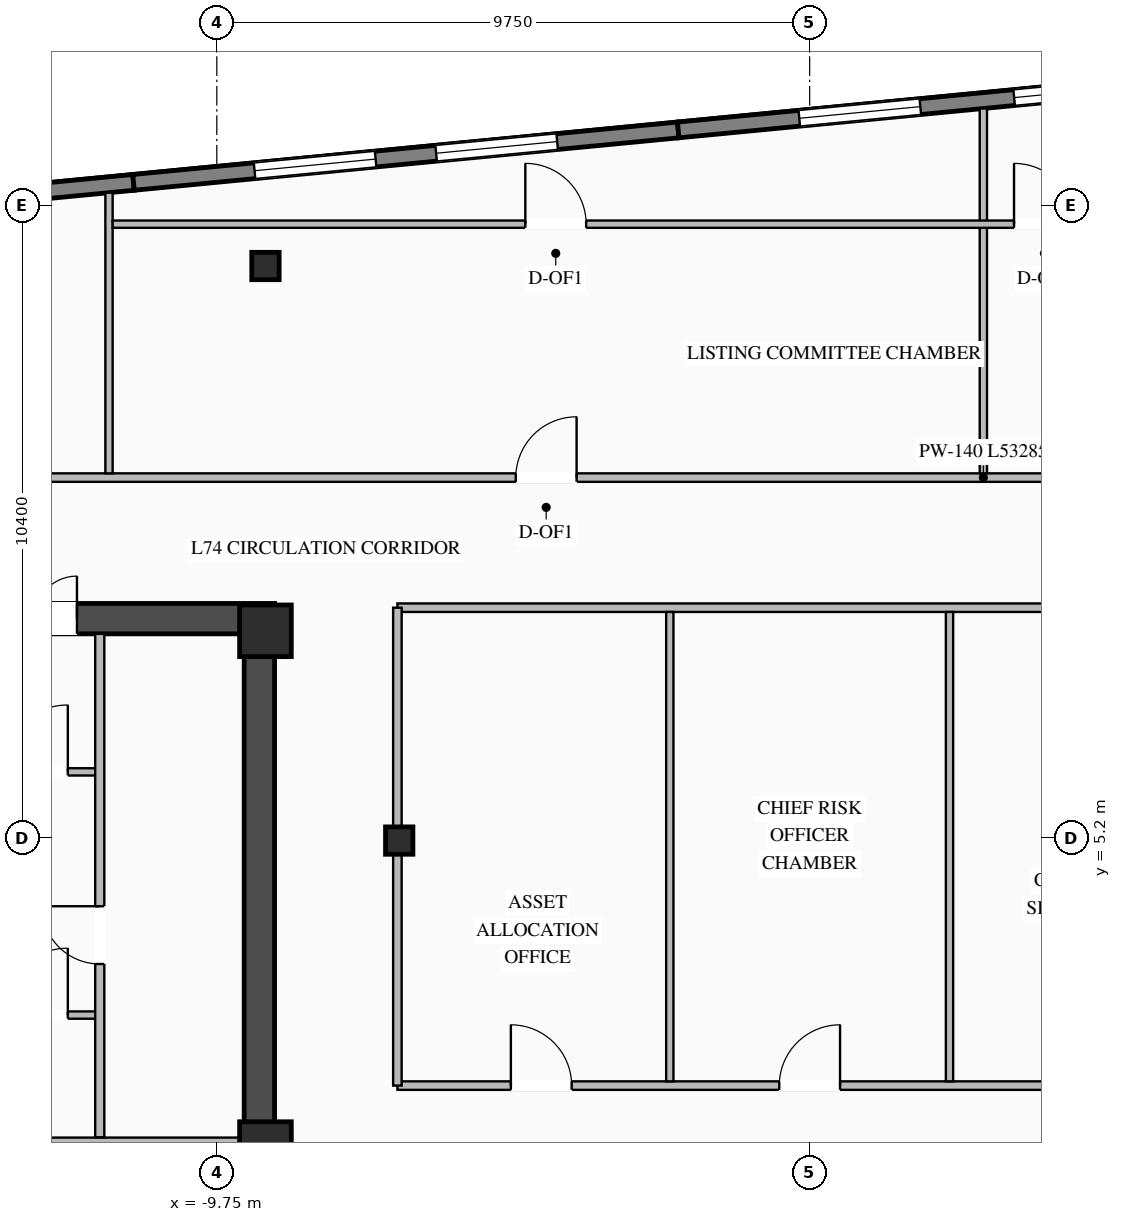
"""IFC4 building model, lengths in metres.
Left out: names, types, materials, properties, quantities, classifications, styles, units other than length and angle.
Written with IfcOpenShell. Run it as: python <this file> out.ifc"""

import sys

from ifc_helpers import new_model, si_unit, direction, frame, frame_2d, origin, origin_2d, place, context, subcontext, project, spatial, rectangle, i_section, extrude, element, fill, save


model = new_model("IFC4")
c1 = context("Model", 3, precision=1e-05, world=origin(), true_north=direction((0.0, 1.0)))
c2 = subcontext(c1, "Body", "Model", "MODEL_VIEW")
j1 = project(units=[si_unit("LENGTHUNIT", "METRE"), si_unit("PLANEANGLEUNIT", "RADIAN")], contexts=[c1])
p1 = place(None, origin())
s1 = spatial("IfcSite", under=j1, at=p1, CompositionType="ELEMENT")
p2 = place(p1, origin())
s2 = spatial("IfcBuilding", under=s1, at=p2, CompositionType="ELEMENT")
p3 = place(p2, frame((0.0, 0.0, 272.4)))
s3 = spatial("IfcBuildingStorey", under=s2, at=p3, CompositionType="ELEMENT", Elevation=272.4)
p4 = place(p3, frame((-19.05, 8.8, 0.0), z_axis=(0.0, 0.0, 1.0), x_axis=(1.0, 0.0, 0.0)))
e1 = element("IfcWall", 1, at=p4, inside=s3, PredefinedType="SHEAR", context=c2, shape_type="SweptSolid", body=[
    extrude(rectangle(XDim=10.25, YDim=0.5, at=frame_2d((5.125, 0.0))), origin(), (0.0, 0.0, 1.0), 3.27),
])
p5 = place(p4, frame((5.6, 0.0, 0.0)))
e2 = element("IfcOpeningElement", 2, at=p5, cuts=e1, PredefinedType="OPENING", context=c2, shape_type="SweptSolid", body=[
    extrude(rectangle(XDim=1.4, YDim=2.05, at=frame_2d((0.7, 1.025))), frame((0.0, 0.26, 0.0), z_axis=(0.0, -1.0, 0.0), x_axis=(1.0, 0.0, 0.0)), (0.0, 0.0, 1.0), 0.52),
])
p6 = place(p3, frame((-9.05, -8.55, 0.0), z_axis=(0.0, 0.0, 1.0), x_axis=(0.0, 1.0, 0.0)))
e3 = element("IfcWall", 3, at=p6, inside=s3, PredefinedType="SHEAR", context=c2, shape_type="SweptSolid", body=[
    extrude(rectangle(XDim=17.1, YDim=0.5, at=frame_2d((8.55, 0.0))), origin(), (0.0, 0.0, 1.0), 3.27),
])
p7 = place(p6, frame((5.3, 0.0, 0.0)))
e4 = element("IfcOpeningElement", 4, at=p7, cuts=e3, PredefinedType="OPENING", context=c2, shape_type="SweptSolid", body=[
    extrude(rectangle(XDim=1.1, YDim=2.08, at=frame_2d((0.55, 1.04))), frame((0.0, 0.26, 0.0), z_axis=(0.0, -1.0, 0.0), x_axis=(1.0, 0.0, 0.0)), (0.0, 0.0, 1.0), 0.52),
])
for number, where, z_axis, x_axis in (
    (5, (-8.95, 0.1, 0.0), (0.0, 0.0, 1.0), (1.0, 0.0, 0.0)),
    (6, (-8.95, 8.6, 0.0), (0.0, 0.0, 1.0), (1.0, 0.0, 0.0)),
):
    element("IfcColumn", number, at=place(p3, frame(where, z_axis=z_axis, x_axis=x_axis)), inside=s3, PredefinedType="COLUMN", context=c2, shape_type="SweptSolid", body=[
        extrude(rectangle(XDim=0.85, YDim=0.85, at=origin_2d()), origin(), (0.0, 0.0, 1.0), 3.45),
    ])
for number, where, z_axis, x_axis in (
    (7, (-6.75, 5.15, 0.0), (0.0, 0.0, 1.0), (1.0, 0.0, 0.0)),
    (8, (-8.95, 14.6, 0.0), (0.0, 0.0, 1.0), (1.0, 0.0, 0.0)),
):
    element("IfcColumn", number, at=place(p3, frame(where, z_axis=z_axis, x_axis=x_axis)), inside=s3, PredefinedType="COLUMN", context=c2, shape_type="SweptSolid", body=[
        extrude(i_section(OverallWidth=0.45, OverallDepth=0.45, WebThickness=0.022, FlangeThickness=0.032, at=origin_2d()), origin(), (0.0, 0.0, 1.0), 3.45),
    ])
p8 = place(p3, frame((-21.821, 14.945, 0.0), z_axis=(0.0, 0.0, 1.0), x_axis=(0.995394787719, 0.095860401528, 0.0)))
e9 = element("IfcWall", 9, at=p8, inside=s3, PredefinedType="STANDARD", context=c2, shape_type="SweptSolid", body=[
    extrude(rectangle(XDim=10.75, YDim=0.26, at=frame_2d((5.375, 0.0))), origin(), (0.0, 0.0, 1.0), 3.25),
])
p9 = place(p8, frame((2.583, 0.0, 0.76)))
e10 = element("IfcOpeningElement", 10, at=p9, cuts=e9, PredefinedType="OPENING", context=c2, shape_type="SweptSolid", body=[
    extrude(rectangle(XDim=2.0, YDim=2.05, at=frame_2d((1.0, 1.025))), frame((0.0, 0.14, 0.0), z_axis=(0.0, -1.0, 0.0), x_axis=(1.0, 0.0, 0.0)), (0.0, 0.0, 1.0), 0.28),
])
p10 = place(p8, frame((6.167, 0.0, 0.76)))
e11 = element("IfcOpeningElement", 11, at=p10, cuts=e9, PredefinedType="OPENING", context=c2, shape_type="SweptSolid", body=[
    extrude(rectangle(XDim=2.0, YDim=2.05, at=frame_2d((1.0, 1.025))), frame((0.0, 0.14, 0.0), z_axis=(0.0, -1.0, 0.0), x_axis=(1.0, 0.0, 0.0)), (0.0, 0.0, 1.0), 0.28),
])
p11 = place(p3, frame((-11.12, 15.975, 0.0), z_axis=(0.0, 0.0, 1.0), x_axis=(0.995396794462, 0.09583956164, 0.0)))
e12 = element("IfcWall", 12, at=p11, inside=s3, PredefinedType="STANDARD", context=c2, shape_type="SweptSolid", body=[
    extrude(rectangle(XDim=9.0, YDim=0.26, at=frame_2d((4.5, 0.0))), origin(), (0.0, 0.0, 1.0), 3.25),
])
p12 = place(p11, frame((2.0, 0.0, 0.76)))
e13 = element("IfcOpeningElement", 13, at=p12, cuts=e12, PredefinedType="OPENING", context=c2, shape_type="SweptSolid", body=[
    extrude(rectangle(XDim=2.0, YDim=2.05, at=frame_2d((1.0, 1.025))), frame((0.0, 0.14, 0.0), z_axis=(0.0, -1.0, 0.0), x_axis=(1.0, 0.0, 0.0)), (0.0, 0.0, 1.0), 0.28),
])
p13 = place(p11, frame((5.0, 0.0, 0.76)))
e14 = element("IfcOpeningElement", 14, at=p13, cuts=e12, PredefinedType="OPENING", context=c2, shape_type="SweptSolid", body=[
    extrude(rectangle(XDim=2.0, YDim=2.05, at=frame_2d((1.0, 1.025))), frame((0.0, 0.14, 0.0), z_axis=(0.0, -1.0, 0.0), x_axis=(1.0, 0.0, 0.0)), (0.0, 0.0, 1.0), 0.28),
])
p14 = place(p3, frame((-2.161, 16.838, 0.0), z_axis=(0.0, 0.0, 1.0), x_axis=(0.995396794462, 0.09583956164, 0.0)))
e15 = element("IfcWall", 15, at=p14, inside=s3, PredefinedType="STANDARD", context=c2, shape_type="SweptSolid", body=[
    extrude(rectangle(XDim=9.0, YDim=0.26, at=frame_2d((4.5, 0.0))), origin(), (0.0, 0.0, 1.0), 3.25),
])
p15 = place(p14, frame((2.0, 0.0, 0.76)))
e16 = element("IfcOpeningElement", 16, at=p15, cuts=e15, PredefinedType="OPENING", context=c2, shape_type="SweptSolid", body=[
    extrude(rectangle(XDim=2.0, YDim=2.05, at=frame_2d((1.0, 1.025))), frame((0.0, 0.14, 0.0), z_axis=(0.0, -1.0, 0.0), x_axis=(1.0, 0.0, 0.0)), (0.0, 0.0, 1.0), 0.28),
])
p16 = place(p14, frame((5.55, 0.0, 0.76)))
e17 = element("IfcOpeningElement", 17, at=p16, cuts=e15, PredefinedType="OPENING", context=c2, shape_type="SweptSolid", body=[
    extrude(rectangle(XDim=2.0, YDim=2.05, at=frame_2d((1.0, 1.025))), frame((0.0, 0.14, 0.0), z_axis=(0.0, -1.0, 0.0), x_axis=(1.0, 0.0, 0.0)), (0.0, 0.0, 1.0), 0.28),
])
p17 = place(p3, frame((-12.89, 0.19, 0.0), z_axis=(0.0, 0.0, 1.0), x_axis=(1.0, 0.0, 0.0)))
e18 = element("IfcWall", 18, at=p17, inside=s3, PredefinedType="STANDARD", context=c2, shape_type="SweptSolid", body=[
    extrude(rectangle(XDim=3.59, YDim=0.15, at=frame_2d((1.795, 0.0))), origin(), (0.0, 0.0, 1.0), 2.645),
])
p18 = place(p3, frame((-13.75, 2.28, 0.0), z_axis=(0.0, 0.0, 1.0), x_axis=(1.0, 0.0, 0.0)))
e19 = element("IfcWall", 19, at=p18, inside=s3, PredefinedType="STANDARD", context=c2, shape_type="SweptSolid", body=[
    extrude(rectangle(XDim=2.0, YDim=0.12, at=frame_2d((1.0, 0.0))), origin(), (0.0, 0.0, 1.0), 3.25),
])
p19 = place(p18, frame((0.45, 0.0, 0.0)))
e20 = element("IfcOpeningElement", 20, at=p19, cuts=e19, PredefinedType="OPENING", context=c2, shape_type="SweptSolid", body=[
    extrude(rectangle(XDim=1.1, YDim=2.1, at=frame_2d((0.55, 1.05))), frame((0.0, 0.07, 0.0), z_axis=(0.0, -1.0, 0.0), x_axis=(1.0, 0.0, 0.0)), (0.0, 0.0, 1.0), 0.14),
])
p20 = place(p3, frame((-13.75, 6.28, 0.0), z_axis=(0.0, 0.0, 1.0), x_axis=(1.0, 0.0, 0.0)))
e21 = element("IfcWall", 21, at=p20, inside=s3, PredefinedType="STANDARD", context=c2, shape_type="SweptSolid", body=[
    extrude(rectangle(XDim=2.0, YDim=0.12, at=frame_2d((1.0, 0.0))), origin(), (0.0, 0.0, 1.0), 3.25),
])
p21 = place(p20, frame((0.45, 0.0, 0.0)))
e22 = element("IfcOpeningElement", 22, at=p21, cuts=e21, PredefinedType="OPENING", context=c2, shape_type="SweptSolid", body=[
    extrude(rectangle(XDim=1.1, YDim=2.1, at=frame_2d((0.55, 1.05))), frame((0.0, 0.07, 0.0), z_axis=(0.0, -1.0, 0.0), x_axis=(1.0, 0.0, 0.0)), (0.0, 0.0, 1.0), 0.14),
])
p22 = place(p3, frame((-11.675, 0.27, 0.0), z_axis=(0.0, 0.0, 1.0), x_axis=(0.0, 1.0, 0.0)))
e23 = element("IfcWall", 23, at=p22, inside=s3, PredefinedType="STANDARD", context=c2, shape_type="SweptSolid", body=[
    extrude(rectangle(XDim=8.28, YDim=0.15, at=frame_2d((4.14, 0.0))), origin(), (0.0, 0.0, 1.0), 3.25),
])
p23 = place(p22, frame((2.85, 0.0, 0.0)))
e24 = element("IfcOpeningElement", 24, at=p23, cuts=e23, PredefinedType="OPENING", context=c2, shape_type="SweptSolid", body=[
    extrude(rectangle(XDim=0.95, YDim=2.05, at=frame_2d((0.475, 1.025))), frame((0.0, 0.085, 0.0), z_axis=(0.0, -1.0, 0.0), x_axis=(1.0, 0.0, 0.0)), (0.0, 0.0, 1.0), 0.17),
])
p24 = place(p3, frame((-23.733, 11.12, 0.0), z_axis=(0.0, 0.0, 1.0), x_axis=(1.0, 0.0, 0.0)))
e25 = element("IfcWall", 25, at=p24, inside=s3, PredefinedType="STANDARD", context=c2, shape_type="SweptSolid", body=[
    extrude(rectangle(XDim=53.285, YDim=0.14, at=frame_2d((26.643, 0.0))), origin(), (0.0, 0.0, 1.0), 3.25),
])
p25 = place(p24, frame((5.731, 0.0, 0.0)))
e26 = element("IfcOpeningElement", 26, at=p25, cuts=e25, PredefinedType="OPENING", context=c2, shape_type="SweptSolid", body=[
    extrude(rectangle(XDim=1.0, YDim=2.08, at=frame_2d((0.5, 1.04))), frame((0.0, 0.08, 0.0), z_axis=(0.0, -1.0, 0.0), x_axis=(1.0, 0.0, 0.0)), (0.0, 0.0, 1.0), 0.16),
])
p26 = place(p24, frame((18.9, 0.0, 0.0)))
e27 = element("IfcOpeningElement", 27, at=p26, cuts=e25, PredefinedType="OPENING", context=c2, shape_type="SweptSolid", body=[
    extrude(rectangle(XDim=1.0, YDim=2.08, at=frame_2d((0.5, 1.04))), frame((0.0, 0.08, 0.0), z_axis=(0.0, -1.0, 0.0), x_axis=(1.0, 0.0, 0.0)), (0.0, 0.0, 1.0), 0.16),
])
p27 = place(p24, frame((33.279, 0.0, 0.0)))
e28 = element("IfcOpeningElement", 28, at=p27, cuts=e25, PredefinedType="OPENING", context=c2, shape_type="SweptSolid", body=[
    extrude(rectangle(XDim=1.0, YDim=2.08, at=frame_2d((0.5, 1.04))), frame((0.0, 0.08, 0.0), z_axis=(0.0, -1.0, 0.0), x_axis=(1.0, 0.0, 0.0)), (0.0, 0.0, 1.0), 0.16),
])
p28 = place(p24, frame((46.501, 0.0, 0.0)))
e29 = element("IfcOpeningElement", 29, at=p28, cuts=e25, PredefinedType="OPENING", context=c2, shape_type="SweptSolid", body=[
    extrude(rectangle(XDim=1.0, YDim=2.08, at=frame_2d((0.5, 1.04))), frame((0.0, 0.08, 0.0), z_axis=(0.0, -1.0, 0.0), x_axis=(1.0, 0.0, 0.0)), (0.0, 0.0, 1.0), 0.16),
])
p29 = place(p3, frame((-11.523, 11.19, 0.0), z_axis=(0.0, 0.0, 1.0), x_axis=(0.0, 1.0, 0.0)))
e30 = element("IfcWall", 30, at=p29, inside=s3, PredefinedType="STANDARD", context=c2, shape_type="SweptSolid", body=[
    extrude(rectangle(XDim=4.616, YDim=0.12, at=frame_2d((2.308, 0.0))), origin(), (0.0, 0.0, 1.0), 3.25),
])
p30 = place(p3, frame((2.857, 11.19, 0.0), z_axis=(0.0, 0.0, 1.0), x_axis=(0.0, 1.0, 0.0)))
e31 = element("IfcWall", 31, at=p30, inside=s3, PredefinedType="STANDARD", context=c2, shape_type="SweptSolid", body=[
    extrude(rectangle(XDim=6.0, YDim=0.12, at=frame_2d((3.0, 0.0))), origin(), (0.0, 0.0, 1.0), 3.25),
])
p31 = place(p3, frame((-11.463, 15.288, 0.0), z_axis=(0.0, 0.0, 1.0), x_axis=(1.0, 0.0, 0.0)))
e32 = element("IfcWall", 32, at=p31, inside=s3, PredefinedType="STANDARD", context=c2, shape_type="SweptSolid", body=[
    extrude(rectangle(XDim=28.639, YDim=0.12, at=frame_2d((14.319, 0.0))), origin(), (0.0, 0.0, 1.0), 2.565),
])
p32 = place(p31, frame((6.787, 0.0, 0.0)))
e33 = element("IfcOpeningElement", 33, at=p32, cuts=e32, PredefinedType="OPENING", context=c2, shape_type="SweptSolid", body=[
    extrude(rectangle(XDim=1.0, YDim=2.08, at=frame_2d((0.5, 1.04))), frame((0.0, 0.07, 0.0), z_axis=(0.0, -1.0, 0.0), x_axis=(1.0, 0.0, 0.0)), (0.0, 0.0, 1.0), 0.14),
])
p33 = place(p31, frame((14.824, 0.0, 0.0)))
e34 = element("IfcOpeningElement", 34, at=p33, cuts=e32, PredefinedType="OPENING", context=c2, shape_type="SweptSolid", body=[
    extrude(rectangle(XDim=1.0, YDim=2.08, at=frame_2d((0.5, 1.04))), frame((0.0, 0.07, 0.0), z_axis=(0.0, -1.0, 0.0), x_axis=(1.0, 0.0, 0.0)), (0.0, 0.0, 1.0), 0.14),
])
p34 = place(p3, frame((-6.78, 1.12, 0.0), z_axis=(0.0, 0.0, 1.0), x_axis=(1.0, 0.0, 0.0)))
e35 = element("IfcWall", 35, at=p34, inside=s3, PredefinedType="STANDARD", context=c2, shape_type="SweptSolid", body=[
    extrude(rectangle(XDim=13.56, YDim=0.14, at=frame_2d((6.78, 0.0))), origin(), (0.0, 0.0, 1.0), 3.25),
])
p35 = place(p34, frame((1.866, 0.0, 0.0)))
e36 = element("IfcOpeningElement", 36, at=p35, cuts=e35, PredefinedType="OPENING", context=c2, shape_type="SweptSolid", body=[
    extrude(rectangle(XDim=1.0, YDim=2.08, at=frame_2d((0.5, 1.04))), frame((0.0, 0.08, 0.0), z_axis=(0.0, -1.0, 0.0), x_axis=(1.0, 0.0, 0.0)), (0.0, 0.0, 1.0), 0.16),
])
p36 = place(p34, frame((6.28, 0.0, 0.0)))
e37 = element("IfcOpeningElement", 37, at=p36, cuts=e35, PredefinedType="OPENING", context=c2, shape_type="SweptSolid", body=[
    extrude(rectangle(XDim=1.0, YDim=2.08, at=frame_2d((0.5, 1.04))), frame((0.0, 0.08, 0.0), z_axis=(0.0, -1.0, 0.0), x_axis=(1.0, 0.0, 0.0)), (0.0, 0.0, 1.0), 0.16),
])
p37 = place(p34, frame((10.694, 0.0, 0.0)))
e38 = element("IfcOpeningElement", 38, at=p37, cuts=e35, PredefinedType="OPENING", context=c2, shape_type="SweptSolid", body=[
    extrude(rectangle(XDim=1.0, YDim=2.08, at=frame_2d((0.5, 1.04))), frame((0.0, 0.08, 0.0), z_axis=(0.0, -1.0, 0.0), x_axis=(1.0, 0.0, 0.0)), (0.0, 0.0, 1.0), 0.16),
])
p38 = place(p3, frame((-6.78, 8.98, 0.0), z_axis=(0.0, 0.0, 1.0), x_axis=(1.0, 0.0, 0.0)))
e39 = element("IfcWall", 39, at=p38, inside=s3, PredefinedType="STANDARD", context=c2, shape_type="SweptSolid", body=[
    extrude(rectangle(XDim=13.56, YDim=0.14, at=frame_2d((6.78, 0.0))), origin(), (0.0, 0.0, 1.0), 3.25),
])
p39 = place(p3, frame((-6.78, 1.12, 0.0), z_axis=(0.0, 0.0, 1.0), x_axis=(0.0, 1.0, 0.0)))
e40 = element("IfcWall", 40, at=p39, inside=s3, PredefinedType="STANDARD", context=c2, shape_type="SweptSolid", body=[
    extrude(rectangle(XDim=7.86, YDim=0.14, at=frame_2d((3.93, 0.0))), origin(), (0.0, 0.0, 1.0), 2.645),
])
for number, where, z_axis, x_axis in (
    (41, (-2.3, 1.19, 0.0), (0.0, 0.0, 1.0), (0.0, 1.0, 0.0)),
    (42, (2.3, 1.19, 0.0), (0.0, 0.0, 1.0), (0.0, 1.0, 0.0)),
):
    element("IfcWall", number, at=place(p3, frame(where, z_axis=z_axis, x_axis=x_axis)), inside=s3, PredefinedType="STANDARD", context=c2, shape_type="SweptSolid", body=[
        extrude(rectangle(XDim=7.72, YDim=0.12, at=frame_2d((3.86, 0.0))), origin(), (0.0, 0.0, 1.0), 3.25),
    ])
p40 = place(p12, origin())
e43 = element("IfcWindow", 43, at=p40, inside=s3, PartitioningType="DOUBLE_PANEL_VERTICAL", PredefinedType="WINDOW", context=c2, shape_type="SweptSolid", body=[
    extrude(rectangle(XDim=2.0, YDim=2.05, at=frame_2d((1.0, 1.025))), frame((0.0, 0.03, 0.0), z_axis=(0.0, -1.0, 0.0), x_axis=(1.0, 0.0, 0.0)), (0.0, 0.0, 1.0), 0.06),
])
fill(e13, e43)
p41 = place(p13, origin())
e44 = element("IfcWindow", 44, at=p41, inside=s3, PartitioningType="DOUBLE_PANEL_VERTICAL", PredefinedType="WINDOW", context=c2, shape_type="SweptSolid", body=[
    extrude(rectangle(XDim=2.0, YDim=2.05, at=frame_2d((1.0, 1.025))), frame((0.0, 0.03, 0.0), z_axis=(0.0, -1.0, 0.0), x_axis=(1.0, 0.0, 0.0)), (0.0, 0.0, 1.0), 0.06),
])
fill(e14, e44)
p42 = place(p15, origin())
e45 = element("IfcWindow", 45, at=p42, inside=s3, PartitioningType="DOUBLE_PANEL_VERTICAL", PredefinedType="WINDOW", context=c2, shape_type="SweptSolid", body=[
    extrude(rectangle(XDim=2.0, YDim=2.05, at=frame_2d((1.0, 1.025))), frame((0.0, 0.03, 0.0), z_axis=(0.0, -1.0, 0.0), x_axis=(1.0, 0.0, 0.0)), (0.0, 0.0, 1.0), 0.06),
])
fill(e16, e45)
p43 = place(p16, origin())
e46 = element("IfcWindow", 46, at=p43, inside=s3, PartitioningType="DOUBLE_PANEL_VERTICAL", PredefinedType="WINDOW", context=c2, shape_type="SweptSolid", body=[
    extrude(rectangle(XDim=2.0, YDim=2.05, at=frame_2d((1.0, 1.025))), frame((0.0, 0.03, 0.0), z_axis=(0.0, -1.0, 0.0), x_axis=(1.0, 0.0, 0.0)), (0.0, 0.0, 1.0), 0.06),
])
fill(e17, e46)
p44 = place(p19, origin())
e47 = element("IfcDoor", 47, at=p44, inside=s3, OperationType="SINGLE_SWING_RIGHT", PredefinedType="DOOR", context=c2, shape_type="SweptSolid", body=[
    extrude(rectangle(XDim=1.1, YDim=2.1, at=frame_2d((0.55, 1.05))), frame((0.0, 0.025, 0.0), z_axis=(0.0, -1.0, 0.0), x_axis=(1.0, 0.0, 0.0)), (0.0, 0.0, 1.0), 0.05),
])
fill(e20, e47)
p45 = place(p21, origin())
e48 = element("IfcDoor", 48, at=p45, inside=s3, OperationType="SINGLE_SWING_RIGHT", PredefinedType="DOOR", context=c2, shape_type="SweptSolid", body=[
    extrude(rectangle(XDim=1.1, YDim=2.1, at=frame_2d((0.55, 1.05))), frame((0.0, 0.025, 0.0), z_axis=(0.0, -1.0, 0.0), x_axis=(1.0, 0.0, 0.0)), (0.0, 0.0, 1.0), 0.05),
])
fill(e22, e48)
p46 = place(p5, origin())
e49 = element("IfcDoor", 49, at=p46, inside=s3, OperationType="DOUBLE_DOOR_SINGLE_SWING", PredefinedType="DOOR", context=c2, shape_type="SweptSolid", body=[
    extrude(rectangle(XDim=1.4, YDim=2.05, at=frame_2d((0.7, 1.025))), frame((0.0, 0.195, 0.0), z_axis=(0.0, -1.0, 0.0), x_axis=(1.0, 0.0, 0.0)), (0.0, 0.0, 1.0), 0.05),
])
fill(e2, e49)
p47 = place(p23, origin())
e50 = element("IfcDoor", 50, at=p47, inside=s3, OperationType="SINGLE_SWING_RIGHT", PredefinedType="DOOR", context=c2, shape_type="SweptSolid", body=[
    extrude(rectangle(XDim=0.95, YDim=2.05, at=frame_2d((0.475, 1.025))), frame((0.0, 0.025, 0.0), z_axis=(0.0, -1.0, 0.0), x_axis=(1.0, 0.0, 0.0)), (0.0, 0.0, 1.0), 0.05),
])
fill(e24, e50)
p48 = place(p26, origin())
e51 = element("IfcDoor", 51, at=p48, inside=s3, OperationType="SINGLE_SWING_RIGHT", PredefinedType="DOOR", context=c2, shape_type="SweptSolid", body=[
    extrude(rectangle(XDim=1.0, YDim=2.08, at=frame_2d((0.5, 1.04))), frame((0.0, 0.025, 0.0), z_axis=(0.0, -1.0, 0.0), x_axis=(1.0, 0.0, 0.0)), (0.0, 0.0, 1.0), 0.05),
])
fill(e27, e51)
p49 = place(p32, origin())
e52 = element("IfcDoor", 52, at=p49, inside=s3, OperationType="SINGLE_SWING_LEFT", PredefinedType="DOOR", context=c2, shape_type="SweptSolid", body=[
    extrude(rectangle(XDim=1.0, YDim=2.08, at=frame_2d((0.5, 1.04))), frame((0.0, 0.025, 0.0), z_axis=(0.0, -1.0, 0.0), x_axis=(1.0, 0.0, 0.0)), (0.0, 0.0, 1.0), 0.05),
])
fill(e33, e52)
p50 = place(p33, origin())
e53 = element("IfcDoor", 53, at=p50, inside=s3, OperationType="SINGLE_SWING_LEFT", PredefinedType="DOOR", context=c2, shape_type="SweptSolid", body=[
    extrude(rectangle(XDim=1.0, YDim=2.08, at=frame_2d((0.5, 1.04))), frame((0.0, 0.025, 0.0), z_axis=(0.0, -1.0, 0.0), x_axis=(1.0, 0.0, 0.0)), (0.0, 0.0, 1.0), 0.05),
])
fill(e34, e53)
p51 = place(p35, origin())
e54 = element("IfcDoor", 54, at=p51, inside=s3, OperationType="SINGLE_SWING_LEFT", PredefinedType="DOOR", context=c2, shape_type="SweptSolid", body=[
    extrude(rectangle(XDim=1.0, YDim=2.08, at=frame_2d((0.5, 1.04))), frame((0.0, 0.025, 0.0), z_axis=(0.0, -1.0, 0.0), x_axis=(1.0, 0.0, 0.0)), (0.0, 0.0, 1.0), 0.05),
])
fill(e36, e54)
p52 = place(p36, origin())
e55 = element("IfcDoor", 55, at=p52, inside=s3, OperationType="SINGLE_SWING_RIGHT", PredefinedType="DOOR", context=c2, shape_type="SweptSolid", body=[
    extrude(rectangle(XDim=1.0, YDim=2.08, at=frame_2d((0.5, 1.04))), frame((0.0, 0.025, 0.0), z_axis=(0.0, -1.0, 0.0), x_axis=(1.0, 0.0, 0.0)), (0.0, 0.0, 1.0), 0.05),
])
fill(e37, e55)
save(model, sys.argv[1])
